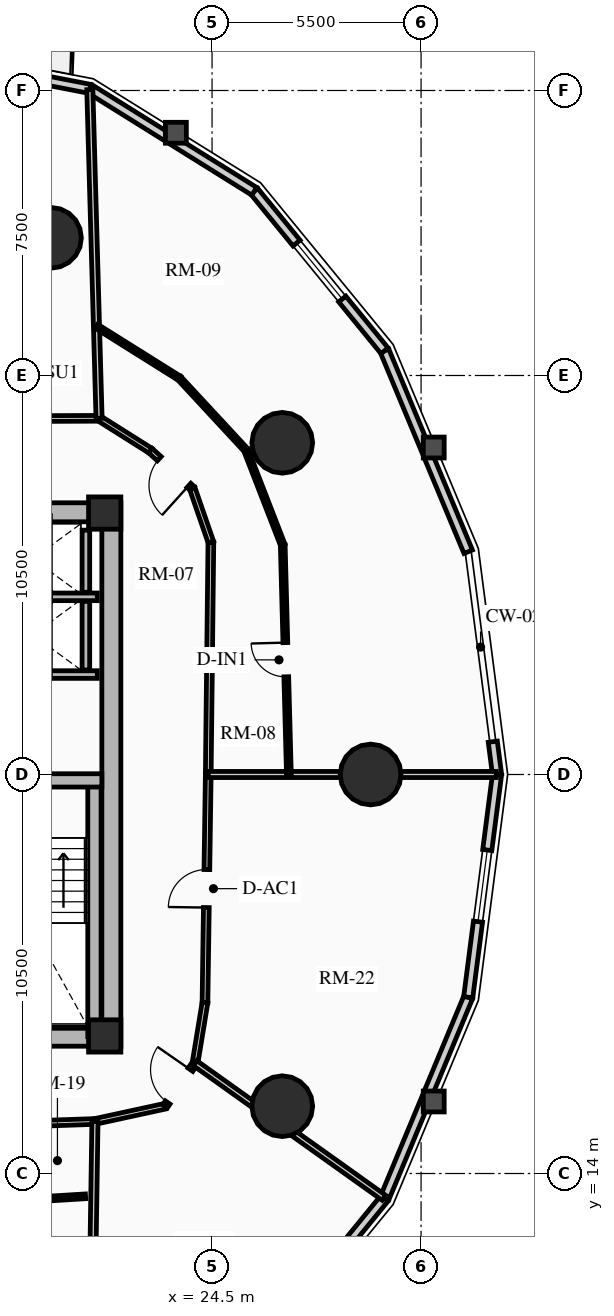
"""IFC4 building model, lengths in metres.
Left out: names, types, materials, properties, quantities, classifications, styles, units other than length and angle.
Written with IfcOpenShell. Run it as: python <this file> out.ifc"""

import sys

from ifc_helpers import new_model, si_unit, direction, frame, frame_2d, origin, origin_2d, place, context, subcontext, project, spatial, rectangle, circle, extrude, source, transform, mapped, element, fill, save


model = new_model("IFC4")
c1 = context("Model", 3, precision=1e-05, world=origin(), true_north=direction((0.0, 1.0)))
c2 = subcontext(c1, "Body", "Model", "MODEL_VIEW")
j1 = project(units=[si_unit("LENGTHUNIT", "METRE"), si_unit("PLANEANGLEUNIT", "RADIAN")], contexts=[c1])
p1 = place(None, origin())
s1 = spatial("IfcSite", under=j1, at=p1, CompositionType="ELEMENT")
p2 = place(p1, origin())
s2 = spatial("IfcBuilding", under=s1, at=p2, CompositionType="ELEMENT")
p3 = place(p2, frame((0.0, 0.0, 42.37)))
s3 = spatial("IfcBuildingStorey", under=s2, at=p3, CompositionType="ELEMENT", Elevation=42.37)
p4 = place(p3, frame((21.85, 17.35, 0.0), z_axis=(0.0, 0.0, 1.0), x_axis=(0.0, 1.0, 0.0)))
e1 = element("IfcWall", 1, at=p4, inside=s3, PredefinedType="SHEAR", context=c2, shape_type="SweptSolid", body=[
    extrude(rectangle(XDim=14.3, YDim=0.5, at=frame_2d((7.15, 0.0))), origin(), (0.0, 0.0, 1.0), 2.91),
])
p5 = place(p3, frame((11.15, 17.6, 0.0), z_axis=(0.0, 0.0, 1.0), x_axis=(1.0, 0.0, 0.0)))
e2 = element("IfcWall", 2, at=p5, inside=s3, PredefinedType="SHEAR", context=c2, shape_type="SweptSolid", body=[
    extrude(rectangle(XDim=10.7, YDim=0.5, at=frame_2d((5.35, 0.0))), origin(), (0.0, 0.0, 1.0), 2.91),
])
m1 = source(origin(), c2, "Body", "SweptSolid", [
    extrude(rectangle(XDim=1.5, YDim=2.02, at=frame_2d((0.75, 1.01))), frame((0.0, 0.26, 0.0), z_axis=(0.0, -1.0, 0.0), x_axis=(1.0, 0.0, 0.0)), (0.0, 0.0, 1.0), 0.52),
])
p6 = place(p5, frame((5.45, 0.0, 0.0)))
e3 = element("IfcOpeningElement", 3, at=p6, cuts=e2, PredefinedType="OPENING", context=c2, shape_type="MappedRepresentation", body=[
    mapped(m1, transform((0.0, 0.0, 0.0), x_axis=(1.0, 0.0, 0.0), y_axis=(0.0, 1.0, 0.0), z_axis=(0.0, 0.0, 1.0), scale=1.0)),
])
p7 = place(p3, frame((11.15, 31.4, 0.0), z_axis=(0.0, 0.0, 1.0), x_axis=(1.0, 0.0, 0.0)))
e4 = element("IfcWall", 4, at=p7, inside=s3, PredefinedType="SHEAR", context=c2, shape_type="SweptSolid", body=[
    extrude(rectangle(XDim=10.7, YDim=0.5, at=frame_2d((5.35, 0.0))), origin(), (0.0, 0.0, 1.0), 2.91),
])
p8 = place(p7, frame((4.6, 0.0, 0.0)))
e5 = element("IfcOpeningElement", 5, at=p8, cuts=e4, PredefinedType="OPENING", context=c2, shape_type="MappedRepresentation", body=[
    mapped(m1, transform((0.0, 0.0, 0.0), x_axis=(1.0, 0.0, 0.0), y_axis=(0.0, 1.0, 0.0), z_axis=(0.0, 0.0, 1.0), scale=1.0)),
])
p9 = place(p3, frame((21.405, 17.6, 0.0), z_axis=(0.0, 0.0, 1.0), x_axis=(0.0, 1.0, 0.0)))
e6 = element("IfcWall", 6, at=p9, inside=s3, PredefinedType="SHEAR", context=c2, shape_type="SweptSolid", body=[
    extrude(rectangle(XDim=6.745, YDim=0.35, at=frame_2d((3.373, 0.0))), origin(), (0.0, 0.0, 1.0), 2.91),
])
p10 = place(p3, frame((18.315, 24.345, 0.0), z_axis=(0.0, 0.0, 1.0), x_axis=(1.0, 0.0, 0.0)))
e7 = element("IfcWall", 7, at=p10, inside=s3, PredefinedType="SHEAR", context=c2, shape_type="SweptSolid", body=[
    extrude(rectangle(XDim=3.285, YDim=0.35, at=frame_2d((1.643, 0.0))), origin(), (0.0, 0.0, 1.0), 2.91),
])
for number, where, z_axis, x_axis in (
    (8, (21.675, 17.62, 0.0), (0.0, 0.0, 1.0), (1.0, 0.0, 0.0)),
    (9, (21.675, 31.38, 0.0), (0.0, 0.0, 1.0), (1.0, 0.0, 0.0)),
):
    element("IfcColumn", number, at=place(p3, frame(where, z_axis=z_axis, x_axis=x_axis)), inside=s3, PredefinedType="COLUMN", context=c2, shape_type="SweptSolid", body=[
        extrude(rectangle(XDim=0.85, YDim=0.85, at=origin_2d()), origin(), (0.0, 0.0, 1.0), 2.91),
    ])
for number, where, z_axis, x_axis in (
    (10, (28.672, 24.5, 0.0), (0.0, 0.0, 1.0), (1.0, 0.0, 0.0)),
    (11, (26.347, 33.229, 0.0), (0.0, 0.0, 1.0), (1.0, 0.0, 0.0)),
    (12, (20.261, 38.623, 0.0), (0.0, 0.0, 1.0), (1.0, 0.0, 0.0)),
    (13, (26.347, 15.771, 0.0), (0.0, 0.0, 1.0), (1.0, 0.0, 0.0)),
):
    element("IfcColumn", number, at=place(p3, frame(where, z_axis=z_axis, x_axis=x_axis)), inside=s3, PredefinedType="USERDEFINED", context=c2, shape_type="SweptSolid", body=[
        extrude(circle(Radius=0.8, at=origin_2d()), origin(), (0.0, 0.0, 1.0), 2.91),
    ])
p11 = place(p3, frame((31.887, 25.363, 0.0), z_axis=(0.0, 0.0, 1.0), x_axis=(0.128523364007, -0.991706481225, 0.0)))
e14 = element("IfcWall", 14, at=p11, inside=s3, PredefinedType="SOLIDWALL", context=c2, shape_type="SweptSolid", body=[
    extrude(rectangle(XDim=0.87, YDim=0.24, at=frame_2d((0.435, 0.0))), origin(), (0.0, 0.0, 1.0), 2.635),
])
p12 = place(p3, frame((29.039, 35.65, 0.0), z_axis=(0.0, 0.0, 1.0), x_axis=(0.38430970593, -0.923204229804, 0.0)))
e15 = element("IfcWall", 15, at=p12, inside=s3, PredefinedType="SOLIDWALL", context=c2, shape_type="SweptSolid", body=[
    extrude(rectangle(XDim=5.728, YDim=0.24, at=frame_2d((2.864, 0.0))), origin(), (0.0, 0.0, 1.0), 2.073),
])
p13 = place(p3, frame((25.61, 39.847, 0.0), z_axis=(0.0, 0.0, 1.0), x_axis=(0.632710215588, -0.774388651189, 0.0)))
e16 = element("IfcWall", 16, at=p13, inside=s3, PredefinedType="SOLIDWALL", context=c2, shape_type="SweptSolid", body=[
    extrude(rectangle(XDim=5.419, YDim=0.24, at=frame_2d((2.71, 0.0))), origin(), (0.0, 0.0, 1.0), 2.073),
])
m2 = source(origin(), c2, "Body", "SweptSolid", [
    extrude(rectangle(XDim=1.9, YDim=1.35, at=frame_2d((0.95, 0.675))), frame((0.0, 0.13, 0.0), z_axis=(0.0, -1.0, 0.0), x_axis=(1.0, 0.0, 0.0)), (0.0, 0.0, 1.0), 0.26),
])
p14 = place(p13, frame((1.76, 0.0, 0.65)))
e17 = element("IfcOpeningElement", 17, at=p14, cuts=e16, PredefinedType="OPENING", context=c2, shape_type="MappedRepresentation", body=[
    mapped(m2, transform((0.0, 0.0, 0.0), x_axis=(1.0, 0.0, 0.0), y_axis=(0.0, 1.0, 0.0), z_axis=(0.0, 0.0, 1.0), scale=1.0)),
])
p15 = place(p3, frame((21.29, 42.542, 0.0), z_axis=(0.0, 0.0, 1.0), x_axis=(0.848528534887, -0.529149624853, 0.0)))
e18 = element("IfcWall", 18, at=p15, inside=s3, PredefinedType="SOLIDWALL", context=c2, shape_type="SweptSolid", body=[
    extrude(rectangle(XDim=5.092, YDim=0.24, at=frame_2d((2.546, 0.0))), origin(), (0.0, 0.0, 1.0), 2.073),
])
p16 = place(p3, frame((16.5, 43.47, 0.0), z_axis=(0.0, 0.0, 1.0), x_axis=(0.981724094622, -0.190309752872, 0.0)))
e19 = element("IfcWall", 19, at=p16, inside=s3, PredefinedType="SOLIDWALL", context=c2, shape_type="SweptSolid", body=[
    extrude(rectangle(XDim=4.879, YDim=0.24, at=frame_2d((2.439, 0.0))), origin(), (0.0, 0.0, 1.0), 2.073),
])
m3 = source(origin(), c2, "Body", "SweptSolid", [
    extrude(rectangle(XDim=1.15, YDim=2.005, at=frame_2d((0.575, 1.002))), frame((0.0, 0.13, 0.0), z_axis=(0.0, -1.0, 0.0), x_axis=(1.0, 0.0, 0.0)), (0.0, 0.0, 1.0), 0.26),
])
p17 = place(p16, frame((1.864, 0.0, 0.0)))
e20 = element("IfcOpeningElement", 20, at=p17, cuts=e19, PredefinedType="OPENING", context=c2, shape_type="MappedRepresentation", body=[
    mapped(m3, transform((0.0, 0.0, 0.0), x_axis=(1.0, 0.0, 0.0), y_axis=(0.0, 1.0, 0.0), z_axis=(0.0, 0.0, 1.0), scale=1.0)),
])
p18 = place(p3, frame((29.039, 13.35, 0.0), z_axis=(0.0, 0.0, 1.0), x_axis=(-0.632710215588, -0.774388651189, 0.0)))
e21 = element("IfcWall", 21, at=p18, inside=s3, PredefinedType="SOLIDWALL", context=c2, shape_type="SweptSolid", body=[
    extrude(rectangle(XDim=5.419, YDim=0.24, at=frame_2d((2.71, 0.0))), origin(), (0.0, 0.0, 1.0), 2.073),
])
p19 = place(p18, frame((1.76, 0.0, 0.65)))
e22 = element("IfcOpeningElement", 22, at=p19, cuts=e21, PredefinedType="OPENING", context=c2, shape_type="MappedRepresentation", body=[
    mapped(m2, transform((0.0, 0.0, 0.0), x_axis=(1.0, 0.0, 0.0), y_axis=(0.0, 1.0, 0.0), z_axis=(0.0, 0.0, 1.0), scale=1.0)),
])
p20 = place(p3, frame((31.24, 18.638, 0.0), z_axis=(0.0, 0.0, 1.0), x_axis=(-0.38430970593, -0.923204229804, 0.0)))
e23 = element("IfcWall", 23, at=p20, inside=s3, PredefinedType="SOLIDWALL", context=c2, shape_type="SweptSolid", body=[
    extrude(rectangle(XDim=5.728, YDim=0.24, at=frame_2d((2.864, 0.0))), origin(), (0.0, 0.0, 1.0), 2.073),
])
p21 = place(p3, frame((31.999, 24.5, 0.0), z_axis=(0.0, 0.0, 1.0), x_axis=(-0.128329107357, -0.991731637191, 0.0)))
e24 = element("IfcWall", 24, at=p21, inside=s3, PredefinedType="SOLIDWALL", context=c2, shape_type="SweptSolid", body=[
    extrude(rectangle(XDim=5.911, YDim=0.24, at=frame_2d((2.956, 0.0))), origin(), (0.0, 0.0, 1.0), 2.073),
])
p22 = place(p21, frame((2.005, 0.0, 0.65)))
e25 = element("IfcOpeningElement", 25, at=p22, cuts=e24, PredefinedType="OPENING", context=c2, shape_type="MappedRepresentation", body=[
    mapped(m2, transform((0.0, 0.0, 0.0), x_axis=(1.0, 0.0, 0.0), y_axis=(0.0, 1.0, 0.0), z_axis=(0.0, 0.0, 1.0), scale=1.0)),
])
for number, where, z_axis, x_axis in (
    (26, (18.51, 27.13, 0.0), (0.0, 0.0, 1.0), (1.0, 0.0, 0.0)),
    (27, (18.51, 29.175, 0.0), (0.0, 0.0, 1.0), (1.0, 0.0, 0.0)),
):
    element("IfcWall", number, at=place(p3, frame(where, z_axis=z_axis, x_axis=x_axis)), inside=s3, PredefinedType="SHEAR", context=c2, shape_type="SweptSolid", body=[
        extrude(rectangle(XDim=2.97, YDim=0.2, at=frame_2d((1.485, 0.0))), origin(), (0.0, 0.0, 1.0), 2.91),
    ])
p23 = place(p3, frame((21.18, 27.25, 0.0), z_axis=(0.0, 0.0, 1.0), x_axis=(0.0, 1.0, 0.0)))
e28 = element("IfcWall", 28, at=p23, inside=s3, PredefinedType="SHEAR", context=c2, shape_type="SweptSolid", body=[
    extrude(rectangle(XDim=1.805, YDim=0.2, at=frame_2d((0.902, 0.0))), origin(), (0.0, 0.0, 1.0), 2.91),
])
p24 = place(p3, frame((21.18, 29.295, 0.0), z_axis=(0.0, 0.0, 1.0), x_axis=(0.0, 1.0, 0.0)))
e29 = element("IfcWall", 29, at=p24, inside=s3, PredefinedType="SHEAR", context=c2, shape_type="SweptSolid", body=[
    extrude(rectangle(XDim=1.635, YDim=0.2, at=frame_2d((0.817, 0.0))), origin(), (0.0, 0.0, 1.0), 2.91),
])
p25 = place(p3, frame((24.4, 24.5, 0.0), z_axis=(0.0, 0.0, 1.0), x_axis=(0.011299841544, 0.999936154752, 0.0)))
e30 = element("IfcWall", 30, at=p25, inside=s3, PredefinedType="PARTITIONING", context=c2, shape_type="SweptSolid", body=[
    extrude(rectangle(XDim=6.115, YDim=0.15, at=frame_2d((3.057, 0.0))), origin(), (0.0, 0.0, 1.0), 2.159),
])
p26 = place(p3, frame((24.469, 30.614, 0.0), z_axis=(0.0, 0.0, 1.0), x_axis=(-0.327228335485, 0.944945298129, 0.0)))
e31 = element("IfcWall", 31, at=p26, inside=s3, PredefinedType="PARTITIONING", context=c2, shape_type="SweptSolid", body=[
    extrude(rectangle(XDim=1.495, YDim=0.15, at=frame_2d((0.748, 0.0))), origin(), (0.0, 0.0, 1.0), 2.205),
])
p27 = place(p3, frame((23.98, 32.027, 0.0), z_axis=(0.0, 0.0, 1.0), x_axis=(-0.742353224332, 0.670008724065, 0.0)))
e32 = element("IfcWall", 32, at=p27, inside=s3, PredefinedType="PARTITIONING", context=c2, shape_type="SweptSolid", body=[
    extrude(rectangle(XDim=1.485, YDim=0.15, at=frame_2d((0.742, 0.0))), origin(), (0.0, 0.0, 1.0), 2.159),
])
m4 = source(origin(), c2, "Body", "SweptSolid", [
    extrude(rectangle(XDim=1.05, YDim=2.015, at=frame_2d((0.525, 1.007))), frame((0.0, 0.085, 0.0), z_axis=(0.0, -1.0, 0.0), x_axis=(1.0, 0.0, 0.0)), (0.0, 0.0, 1.0), 0.17),
])
p28 = place(p27, frame((0.12, 0.0, 0.0)))
e33 = element("IfcOpeningElement", 33, at=p28, cuts=e32, PredefinedType="OPENING", context=c2, shape_type="MappedRepresentation", body=[
    mapped(m4, transform((0.0, 0.0, 0.0), x_axis=(1.0, 0.0, 0.0), y_axis=(0.0, 1.0, 0.0), z_axis=(0.0, 0.0, 1.0), scale=1.0)),
])
p29 = place(p3, frame((22.877, 33.022, 0.0), z_axis=(0.0, 0.0, 1.0), x_axis=(-0.845895608855, 0.533348496689, 0.0)))
e34 = element("IfcWall", 34, at=p29, inside=s3, PredefinedType="PARTITIONING", context=c2, shape_type="SweptSolid", body=[
    extrude(rectangle(XDim=1.597, YDim=0.15, at=frame_2d((0.798, 0.0))), origin(), (0.0, 0.0, 1.0), 2.205),
])
p30 = place(p3, frame((21.527, 33.873, 0.0), z_axis=(0.0, 0.0, 1.0), x_axis=(-0.999991838845, -0.004040079574, 0.0)))
e35 = element("IfcWall", 35, at=p30, inside=s3, PredefinedType="PARTITIONING", context=c2, shape_type="SweptSolid", body=[
    extrude(rectangle(XDim=3.384, YDim=0.15, at=frame_2d((1.692, 0.0))), origin(), (0.0, 0.0, 1.0), 2.159),
])
p31 = place(p30, frame((1.56, 0.0, 0.0)))
e36 = element("IfcOpeningElement", 36, at=p31, cuts=e35, PredefinedType="OPENING", context=c2, shape_type="MappedRepresentation", body=[
    mapped(m4, transform((0.0, 0.0, 0.0), x_axis=(1.0, 0.0, 0.0), y_axis=(0.0, 1.0, 0.0), z_axis=(0.0, 0.0, 1.0), scale=1.0)),
])
p32 = place(p3, frame((14.781, 15.141, 0.0), z_axis=(0.0, 0.0, 1.0), x_axis=(0.999407918707, 0.034406569513, 0.0)))
e37 = element("IfcWall", 37, at=p32, inside=s3, PredefinedType="PARTITIONING", context=c2, shape_type="SweptSolid", body=[
    extrude(rectangle(XDim=6.642, YDim=0.15, at=frame_2d((3.321, 0.0))), origin(), (0.0, 0.0, 1.0), 2.159),
])
p33 = place(p3, frame((21.419, 15.369, 0.0), z_axis=(0.0, 0.0, 1.0), x_axis=(0.977192701953, 0.212354475464, 0.0)))
e38 = element("IfcWall", 38, at=p33, inside=s3, PredefinedType="PARTITIONING", context=c2, shape_type="SweptSolid", body=[
    extrude(rectangle(XDim=1.888, YDim=0.15, at=frame_2d((0.944, 0.0))), origin(), (0.0, 0.0, 1.0), 2.205),
])
p34 = place(p3, frame((23.263, 15.77, 0.0), z_axis=(0.0, 0.0, 1.0), x_axis=(0.570743456919, 0.821128434768, 0.0)))
e39 = element("IfcWall", 39, at=p34, inside=s3, PredefinedType="PARTITIONING", context=c2, shape_type="SweptSolid", body=[
    extrude(rectangle(XDim=1.382, YDim=0.15, at=frame_2d((0.691, 0.0))), origin(), (0.0, 0.0, 1.0), 2.159),
])
p35 = place(p34, frame((0.12, 0.0, 0.0)))
e40 = element("IfcOpeningElement", 40, at=p35, cuts=e39, PredefinedType="OPENING", context=c2, shape_type="MappedRepresentation", body=[
    mapped(m4, transform((0.0, 0.0, 0.0), x_axis=(1.0, 0.0, 0.0), y_axis=(0.0, 1.0, 0.0), z_axis=(0.0, 0.0, 1.0), scale=1.0)),
])
p36 = place(p3, frame((24.052, 16.905, 0.0), z_axis=(0.0, 0.0, 1.0), x_axis=(0.162091534225, 0.986775726562, 0.0)))
e41 = element("IfcWall", 41, at=p36, inside=s3, PredefinedType="PARTITIONING", context=c2, shape_type="SweptSolid", body=[
    extrude(rectangle(XDim=1.613, YDim=0.15, at=frame_2d((0.807, 0.0))), origin(), (0.0, 0.0, 1.0), 2.205),
])
p37 = place(p3, frame((24.313, 18.496, 0.0), z_axis=(0.0, 0.0, 1.0), x_axis=(0.014394019188, 0.999896400739, 0.0)))
e42 = element("IfcWall", 42, at=p37, inside=s3, PredefinedType="PARTITIONING", context=c2, shape_type="SweptSolid", body=[
    extrude(rectangle(XDim=6.004, YDim=0.15, at=frame_2d((3.002, 0.0))), origin(), (0.0, 0.0, 1.0), 2.635),
])
m5 = source(origin(), c2, "Body", "SweptSolid", [
    extrude(rectangle(XDim=1.0, YDim=2.015, at=frame_2d((0.5, 1.007))), frame((0.0, 0.085, 0.0), z_axis=(0.0, -1.0, 0.0), x_axis=(1.0, 0.0, 0.0)), (0.0, 0.0, 1.0), 0.17),
])
p38 = place(p37, frame((2.502, 0.0, 0.0)))
e43 = element("IfcOpeningElement", 43, at=p38, cuts=e42, PredefinedType="OPENING", context=c2, shape_type="MappedRepresentation", body=[
    mapped(m5, transform((0.0, 0.0, 0.0), x_axis=(1.0, 0.0, 0.0), y_axis=(0.0, 1.0, 0.0), z_axis=(0.0, 0.0, 1.0), scale=1.0)),
])
p39 = place(p3, frame((24.4, 24.5, 0.0), z_axis=(0.0, 0.0, 1.0), x_axis=(1.0, 0.0, 0.0)))
e44 = element("IfcWall", 44, at=p39, inside=s3, PredefinedType="PARTITIONING", context=c2, shape_type="SweptSolid", body=[
    extrude(rectangle(XDim=7.579, YDim=0.16, at=frame_2d((3.79, 0.0))), origin(), (0.0, 0.0, 1.0), 2.073),
])
p40 = place(p3, frame((21.527, 33.873, 0.0), z_axis=(0.0, 0.0, 1.0), x_axis=(-0.028159433134, 0.999603444535, 0.0)))
e45 = element("IfcWall", 45, at=p40, inside=s3, PredefinedType="PARTITIONING", context=c2, shape_type="SweptSolid", body=[
    extrude(rectangle(XDim=8.653, YDim=0.16, at=frame_2d((4.326, 0.0))), origin(), (0.0, 0.0, 1.0), 2.073),
])
p41 = place(p3, frame((21.419, 15.369, 0.0), z_axis=(0.0, 0.0, 1.0), x_axis=(-0.015237110632, -0.999883908491, 0.0)))
e46 = element("IfcWall", 46, at=p41, inside=s3, PredefinedType="PARTITIONING", context=c2, shape_type="SweptSolid", body=[
    extrude(rectangle(XDim=8.893, YDim=0.16, at=frame_2d((4.446, 0.0))), origin(), (0.0, 0.0, 1.0), 2.073),
])
p42 = place(p3, frame((24.052, 16.905, 0.0), z_axis=(0.0, 0.0, 1.0), x_axis=(0.814316784985, -0.580420686822, 0.0)))
e47 = element("IfcWall", 47, at=p42, inside=s3, PredefinedType="PARTITIONING", context=c2, shape_type="SweptSolid", body=[
    extrude(rectangle(XDim=6.104, YDim=0.16, at=frame_2d((3.052, 0.0))), origin(), (0.0, 0.0, 1.0), 2.073),
])
p43 = place(p3, frame((26.522, 24.5, 0.0), z_axis=(0.0, 0.0, 1.0), x_axis=(-0.026902612335, 0.999638059224, 0.0)))
e48 = element("IfcWall", 48, at=p43, inside=s3, PredefinedType="PARTITIONING", context=c2, shape_type="SweptSolid", body=[
    extrude(rectangle(XDim=6.044, YDim=0.125, at=frame_2d((3.022, 0.0))), origin(), (0.0, 0.0, 1.0), 2.159),
])
m6 = source(origin(), c2, "Body", "SweptSolid", [
    extrude(rectangle(XDim=0.9, YDim=2.005, at=frame_2d((0.45, 1.002))), frame((0.0, 0.073, 0.0), z_axis=(0.0, -1.0, 0.0), x_axis=(1.0, 0.0, 0.0)), (0.0, 0.0, 1.0), 0.145),
])
p44 = place(p43, frame((2.572, 0.0, 0.0)))
e49 = element("IfcOpeningElement", 49, at=p44, cuts=e48, PredefinedType="OPENING", context=c2, shape_type="MappedRepresentation", body=[
    mapped(m6, transform((0.0, 0.0, 0.0), x_axis=(1.0, 0.0, 0.0), y_axis=(0.0, 1.0, 0.0), z_axis=(0.0, 0.0, 1.0), scale=1.0)),
])
p45 = place(p3, frame((26.36, 30.542, 0.0), z_axis=(0.0, 0.0, 1.0), x_axis=(-0.361464762384, 0.932385770781, 0.0)))
e50 = element("IfcWall", 50, at=p45, inside=s3, PredefinedType="PARTITIONING", context=c2, shape_type="SweptSolid", body=[
    extrude(rectangle(XDim=2.677, YDim=0.125, at=frame_2d((1.339, 0.0))), origin(), (0.0, 0.0, 1.0), 2.159),
])
p46 = place(p3, frame((25.392, 33.038, 0.0), z_axis=(0.0, 0.0, 1.0), x_axis=(-0.67989141147, 0.733312804068, 0.0)))
e51 = element("IfcWall", 51, at=p46, inside=s3, PredefinedType="PARTITIONING", context=c2, shape_type="SweptSolid", body=[
    extrude(rectangle(XDim=2.578, YDim=0.125, at=frame_2d((1.289, 0.0))), origin(), (0.0, 0.0, 1.0), 2.635),
])
p47 = place(p3, frame((23.639, 34.928, 0.0), z_axis=(0.0, 0.0, 1.0), x_axis=(-0.847294097071, 0.531124009125, 0.0)))
e52 = element("IfcWall", 52, at=p47, inside=s3, PredefinedType="PARTITIONING", context=c2, shape_type="SweptSolid", body=[
    extrude(rectangle(XDim=2.574, YDim=0.125, at=frame_2d((1.287, 0.0))), origin(), (0.0, 0.0, 1.0), 2.205),
])
p48 = place(p3, frame((18.181, 13.216, 0.0), z_axis=(0.0, 0.0, 1.0), x_axis=(0.998120468621, 0.061282380177, 0.0)))
e53 = element("IfcWall", 53, at=p48, inside=s3, PredefinedType="PARTITIONING", context=c2, shape_type="SweptSolid", body=[
    extrude(rectangle(XDim=2.996, YDim=0.125, at=frame_2d((1.498, 0.0))), origin(), (0.0, 0.0, 1.0), 2.159),
])
p49 = place(p48, frame((0.12, 0.0, 0.0)))
e54 = element("IfcOpeningElement", 54, at=p49, cuts=e53, PredefinedType="OPENING", context=c2, shape_type="MappedRepresentation", body=[
    mapped(m6, transform((0.0, 0.0, 0.0), x_axis=(1.0, 0.0, 0.0), y_axis=(0.0, 1.0, 0.0), z_axis=(0.0, 0.0, 1.0), scale=1.0)),
])
m7 = source(origin(), c2, "Body", "SweptSolid", [
    extrude(rectangle(XDim=1.9, YDim=1.35, at=frame_2d((0.95, 0.675))), frame((0.0, 0.03, 0.0), z_axis=(0.0, -1.0, 0.0), x_axis=(1.0, 0.0, 0.0)), (0.0, 0.0, 1.0), 0.06),
])
p50 = place(p14, origin())
e55 = element("IfcWindow", 55, at=p50, inside=s3, PartitioningType="DOUBLE_PANEL_VERTICAL", PredefinedType="WINDOW", context=c2, shape_type="MappedRepresentation", body=[
    mapped(m7, transform((0.0, 0.0, 0.0), x_axis=(1.0, 0.0, 0.0), y_axis=(0.0, 1.0, 0.0), z_axis=(0.0, 0.0, 1.0), scale=1.0)),
])
fill(e17, e55)
p51 = place(p22, origin())
e56 = element("IfcWindow", 56, at=p51, inside=s3, PartitioningType="DOUBLE_PANEL_VERTICAL", PredefinedType="WINDOW", context=c2, shape_type="MappedRepresentation", body=[
    mapped(m7, transform((0.0, 0.0, 0.0), x_axis=(1.0, 0.0, 0.0), y_axis=(0.0, 1.0, 0.0), z_axis=(0.0, 0.0, 1.0), scale=1.0)),
])
fill(e25, e56)
m8 = source(origin(), c2, "Body", "SweptSolid", [
    extrude(rectangle(XDim=1.05, YDim=2.015, at=frame_2d((0.525, 1.007))), frame((0.0, 0.025, 0.0), z_axis=(0.0, -1.0, 0.0), x_axis=(1.0, 0.0, 0.0)), (0.0, 0.0, 1.0), 0.05),
])
p52 = place(p28, origin())
e57 = element("IfcDoor", 57, at=p52, inside=s3, OperationType="SINGLE_SWING_LEFT", PredefinedType="DOOR", context=c2, shape_type="MappedRepresentation", body=[
    mapped(m8, transform((0.0, 0.0, 0.0), x_axis=(1.0, 0.0, 0.0), y_axis=(0.0, 1.0, 0.0), z_axis=(0.0, 0.0, 1.0), scale=1.0)),
])
fill(e33, e57)
m9 = source(origin(), c2, "Body", "SweptSolid", [
    extrude(rectangle(XDim=0.9, YDim=2.005, at=frame_2d((0.45, 1.002))), frame((0.0, 0.025, 0.0), z_axis=(0.0, -1.0, 0.0), x_axis=(1.0, 0.0, 0.0)), (0.0, 0.0, 1.0), 0.05),
])
p53 = place(p44, origin())
e58 = element("IfcDoor", 58, at=p53, inside=s3, OperationType="SINGLE_SWING_RIGHT", PredefinedType="DOOR", context=c2, shape_type="MappedRepresentation", body=[
    mapped(m9, transform((0.0, 0.0, 0.0), x_axis=(1.0, 0.0, 0.0), y_axis=(0.0, 1.0, 0.0), z_axis=(0.0, 0.0, 1.0), scale=1.0)),
])
fill(e49, e58)
p54 = place(p35, origin())
e59 = element("IfcDoor", 59, at=p54, inside=s3, OperationType="SINGLE_SWING_RIGHT", PredefinedType="DOOR", context=c2, shape_type="MappedRepresentation", body=[
    mapped(m8, transform((0.0, 0.0, 0.0), x_axis=(1.0, 0.0, 0.0), y_axis=(0.0, 1.0, 0.0), z_axis=(0.0, 0.0, 1.0), scale=1.0)),
])
fill(e40, e59)
m10 = source(origin(), c2, "Body", "SweptSolid", [
    extrude(rectangle(XDim=1.0, YDim=2.015, at=frame_2d((0.5, 1.007))), frame((0.0, 0.025, 0.0), z_axis=(0.0, -1.0, 0.0), x_axis=(1.0, 0.0, 0.0)), (0.0, 0.0, 1.0), 0.05),
])
p55 = place(p38, origin())
e60 = element("IfcDoor", 60, at=p55, inside=s3, OperationType="SINGLE_SWING_LEFT", PredefinedType="DOOR", context=c2, shape_type="MappedRepresentation", body=[
    mapped(m10, transform((0.0, 0.0, 0.0), x_axis=(1.0, 0.0, 0.0), y_axis=(0.0, 1.0, 0.0), z_axis=(0.0, 0.0, 1.0), scale=1.0)),
])
fill(e43, e60)
save(model, sys.argv[1])
